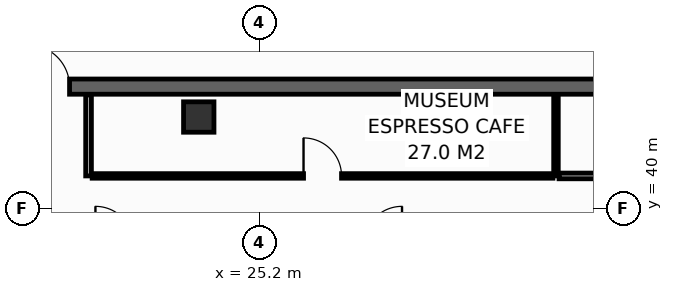
"""IFC4 building model, lengths in metres.
Left out: names, types, materials, properties, quantities, classifications, styles, units other than length and angle.
Written with IfcOpenShell. Run it as: python <this file> out.ifc"""

import sys

from ifc_helpers import new_model, si_unit, direction, frame, frame_2d, origin, origin_2d, place, context, subcontext, project, spatial, rectangle, hollow_rectangle, extrude, element, fill, save


model = new_model("IFC4")
c1 = context("Model", 3, precision=1e-05, world=origin(), true_north=direction((0.0, 1.0)))
c2 = subcontext(c1, "Body", "Model", "MODEL_VIEW")
j1 = project(units=[si_unit("LENGTHUNIT", "METRE"), si_unit("PLANEANGLEUNIT", "RADIAN")], contexts=[c1])
p1 = place(None, origin())
s1 = spatial("IfcSite", under=j1, at=p1, CompositionType="ELEMENT")
p2 = place(p1, origin())
s2 = spatial("IfcBuilding", under=s1, at=p2, CompositionType="ELEMENT")
p3 = place(p2, frame((0.0, 0.0, 253.4)))
s3 = spatial("IfcBuildingStorey", under=s2, at=p3, CompositionType="ELEMENT", Elevation=253.4)
p4 = place(p3, frame((13.7, 43.2, 0.0), z_axis=(0.0, 0.0, 1.0), x_axis=(1.0, 0.0, 0.0)))
e1 = element("IfcWall", 1, at=p4, inside=s3, PredefinedType="SHEAR", context=c2, shape_type="SweptSolid", body=[
    extrude(rectangle(XDim=32.5, YDim=0.4, at=frame_2d((16.25, 0.0))), origin(), (0.0, 0.0, 1.0), 3.55),
])
p5 = place(p4, frame((5.4, 0.0, 0.0)))
e2 = element("IfcOpeningElement", 2, at=p5, cuts=e1, PredefinedType="OPENING", context=c2, shape_type="SweptSolid", body=[
    extrude(rectangle(XDim=1.1, YDim=2.15, at=frame_2d((0.55, 1.075))), frame((0.0, 0.21, 0.0), z_axis=(0.0, -1.0, 0.0), x_axis=(1.0, 0.0, 0.0)), (0.0, 0.0, 1.0), 0.42),
])
p6 = place(p4, frame((25.6, 0.0, 0.0)))
e3 = element("IfcOpeningElement", 3, at=p6, cuts=e1, PredefinedType="OPENING", context=c2, shape_type="SweptSolid", body=[
    extrude(rectangle(XDim=1.1, YDim=2.15, at=frame_2d((0.55, 1.075))), frame((0.0, 0.21, 0.0), z_axis=(0.0, -1.0, 0.0), x_axis=(1.0, 0.0, 0.0)), (0.0, 0.0, 1.0), 0.42),
])
p7 = place(p3, frame((23.6, 42.4, 0.0), z_axis=(0.0, 0.0, 1.0), x_axis=(1.0, 0.0, 0.0)))
e4 = element("IfcColumn", 4, at=p7, inside=s3, PredefinedType="COLUMN", context=c2, shape_type="SweptSolid", body=[
    extrude(hollow_rectangle(XDim=0.8, YDim=0.8, WallThickness=0.036, at=origin_2d()), origin(), (0.0, 0.0, 1.0), 3.8),
])
p8 = place(p3, frame((20.7, 40.85, 0.0), z_axis=(0.0, 0.0, 1.0), x_axis=(0.0, 1.0, 0.0)))
e5 = element("IfcWall", 5, at=p8, inside=s3, PredefinedType="PARTITIONING", context=c2, shape_type="SweptSolid", body=[
    extrude(rectangle(XDim=2.13, YDim=0.15, at=frame_2d((1.065, 0.0))), origin(), (0.0, 0.0, 1.0), 3.55),
])
p9 = place(p3, frame((33.0, 40.85, 0.0), z_axis=(0.0, 0.0, 1.0), x_axis=(0.0, 1.0, 0.0)))
e6 = element("IfcWall", 6, at=p9, inside=s3, PredefinedType="PARTITIONING", context=c2, shape_type="SweptSolid", body=[
    extrude(rectangle(XDim=2.13, YDim=0.12, at=frame_2d((1.065, 0.0))), origin(), (0.0, 0.0, 1.0), 2.947),
])
p10 = place(p3, frame((20.795, 40.85, 0.0), z_axis=(0.0, 0.0, 1.0), x_axis=(1.0, 0.0, 0.0)))
e7 = element("IfcWall", 7, at=p10, inside=s3, PredefinedType="PARTITIONING", context=c2, shape_type="SweptSolid", body=[
    extrude(rectangle(XDim=12.125, YDim=0.12, at=frame_2d((6.062, 0.0))), origin(), (0.0, 0.0, 1.0), 2.947),
])
p11 = place(p10, frame((5.562, 0.0, 0.0)))
e8 = element("IfcOpeningElement", 8, at=p11, cuts=e7, PredefinedType="OPENING", context=c2, shape_type="SweptSolid", body=[
    extrude(rectangle(XDim=1.0, YDim=2.15, at=frame_2d((0.5, 1.075))), frame((0.0, 0.07, 0.0), z_axis=(0.0, -1.0, 0.0), x_axis=(1.0, 0.0, 0.0)), (0.0, 0.0, 1.0), 0.14),
])
p12 = place(p3, frame((33.08, 40.85, 0.0), z_axis=(0.0, 0.0, 1.0), x_axis=(1.0, 0.0, 0.0)))
e9 = element("IfcWall", 9, at=p12, inside=s3, PredefinedType="PARTITIONING", context=c2, shape_type="SweptSolid", body=[
    extrude(rectangle(XDim=5.625, YDim=0.15, at=frame_2d((2.812, 0.0))), origin(), (0.0, 0.0, 1.0), 2.947),
])
p13 = place(p12, frame((1.652, 0.0, 0.0)))
e10 = element("IfcOpeningElement", 10, at=p13, cuts=e9, PredefinedType="OPENING", context=c2, shape_type="SweptSolid", body=[
    extrude(rectangle(XDim=1.0, YDim=2.15, at=frame_2d((0.5, 1.075))), frame((0.0, 0.085, 0.0), z_axis=(0.0, -1.0, 0.0), x_axis=(1.0, 0.0, 0.0)), (0.0, 0.0, 1.0), 0.17),
])
p14 = place(p5, origin())
e11 = element("IfcDoor", 11, at=p14, inside=s3, OperationType="SINGLE_SWING_LEFT", PredefinedType="DOOR", context=c2, shape_type="SweptSolid", body=[
    extrude(rectangle(XDim=1.1, YDim=2.15, at=frame_2d((0.55, 1.075))), frame((0.0, 0.025, 0.0), z_axis=(0.0, -1.0, 0.0), x_axis=(1.0, 0.0, 0.0)), (0.0, 0.0, 1.0), 0.05),
])
fill(e2, e11)
p15 = place(p11, origin())
e12 = element("IfcDoor", 12, at=p15, inside=s3, OperationType="SINGLE_SWING_LEFT", PredefinedType="DOOR", context=c2, shape_type="SweptSolid", body=[
    extrude(rectangle(XDim=1.0, YDim=2.15, at=frame_2d((0.5, 1.075))), frame((0.0, 0.025, 0.0), z_axis=(0.0, -1.0, 0.0), x_axis=(1.0, 0.0, 0.0)), (0.0, 0.0, 1.0), 0.05),
])
fill(e8, e12)
save(model, sys.argv[1])
